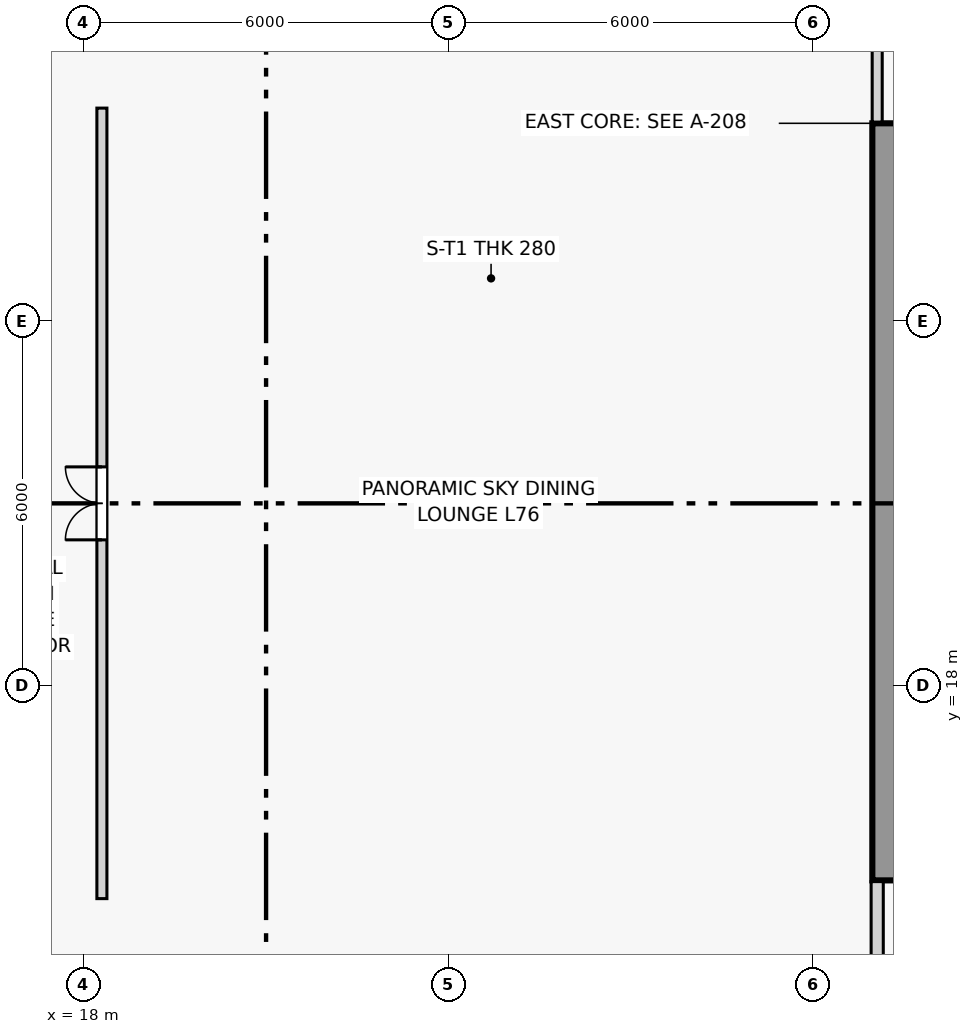
"""IFC4 building model, lengths in metres.
Left out: names, types, materials, properties, quantities, classifications, styles, units other than length and angle.
Written with IfcOpenShell. Run it as: python <this file> out.ifc"""

import sys

from ifc_helpers import new_model, si_unit, direction, frame, frame_2d, origin, place, context, subcontext, project, spatial, rectangle, extrude, source, transform, mapped, element, fill, save


model = new_model("IFC4")
c1 = context("Model", 3, precision=1e-05, world=origin(), true_north=direction((0.0, 1.0)))
c2 = subcontext(c1, "Body", "Model", "MODEL_VIEW")
j1 = project(units=[si_unit("LENGTHUNIT", "METRE"), si_unit("PLANEANGLEUNIT", "RADIAN")], contexts=[c1])
p1 = place(None, origin())
s1 = spatial("IfcSite", under=j1, at=p1, CompositionType="ELEMENT")
p2 = place(p1, origin())
s2 = spatial("IfcBuilding", under=s1, at=p2, CompositionType="ELEMENT")
p3 = place(p2, frame((0.0, 0.0, 289.5)))
s3 = spatial("IfcBuildingStorey", under=s2, at=p3, CompositionType="ELEMENT", Elevation=289.5)
p4 = place(p3, frame((31.245, 14.8, 0.0), z_axis=(0.0, 0.0, 1.0), x_axis=(0.0, 1.0, 0.0)))
e1 = element("IfcWall", 1, at=p4, inside=s3, PredefinedType="SHEAR", context=c2, shape_type="SweptSolid", body=[
    extrude(rectangle(XDim=12.45, YDim=0.55, at=frame_2d((6.225, 0.0))), origin(), (0.0, 0.0, 1.0), 4.2),
])
p5 = place(p3, frame((31.05, 11.445, 0.0), z_axis=(0.0, 0.0, 1.0), x_axis=(0.0, 1.0, 0.0)))
e2 = element("IfcWall", 2, at=p5, inside=s3, PredefinedType="PARTITIONING", context=c2, shape_type="SweptSolid", body=[
    extrude(rectangle(XDim=3.335, YDim=0.2, at=frame_2d((1.667, 0.0))), origin(), (0.0, 0.0, 1.0), 3.07),
])
p6 = place(p3, frame((31.05, 27.27, 0.0), z_axis=(0.0, 0.0, 1.0), x_axis=(0.0, 1.0, 0.0)))
e3 = element("IfcWall", 3, at=p6, inside=s3, PredefinedType="PARTITIONING", context=c2, shape_type="SweptSolid", body=[
    extrude(rectangle(XDim=3.153, YDim=0.165, at=frame_2d((1.576, 0.0))), origin(), (0.0, 0.0, 1.0), 3.92),
])
p7 = place(p3, frame((18.3, 14.5, 0.0), z_axis=(0.0, 0.0, 1.0), x_axis=(0.0, 1.0, 0.0)))
e4 = element("IfcWall", 4, at=p7, inside=s3, PredefinedType="PARTITIONING", context=c2, shape_type="SweptSolid", body=[
    extrude(rectangle(XDim=13.0, YDim=0.165, at=frame_2d((6.5, 0.0))), origin(), (0.0, 0.0, 1.0), 3.92),
])
p8 = place(p7, frame((5.9, 0.0, 0.0)))
e5 = element("IfcOpeningElement", 5, at=p8, cuts=e4, PredefinedType="OPENING", context=c2, shape_type="SweptSolid", body=[
    extrude(rectangle(XDim=1.2, YDim=2.2, at=frame_2d((0.6, 1.1))), frame((0.0, 0.093, 0.0), z_axis=(0.0, -1.0, 0.0), x_axis=(1.0, 0.0, 0.0)), (0.0, 0.0, 1.0), 0.185),
])
m1 = source(origin(), c2, "Body", "SweptSolid", [
    extrude(rectangle(XDim=1.2, YDim=2.2, at=frame_2d((0.6, 1.1))), frame((0.0, 0.025, 0.0), z_axis=(0.0, -1.0, 0.0), x_axis=(1.0, 0.0, 0.0)), (0.0, 0.0, 1.0), 0.05),
])
p9 = place(p8, origin())
e6 = element("IfcDoor", 6, at=p9, inside=s3, OperationType="DOUBLE_DOOR_SINGLE_SWING", PredefinedType="DOOR", context=c2, shape_type="MappedRepresentation", body=[
    mapped(m1, transform((0.0, 0.0, 0.0), scale=1.0)),
])
fill(e5, e6)
save(model, sys.argv[1])
